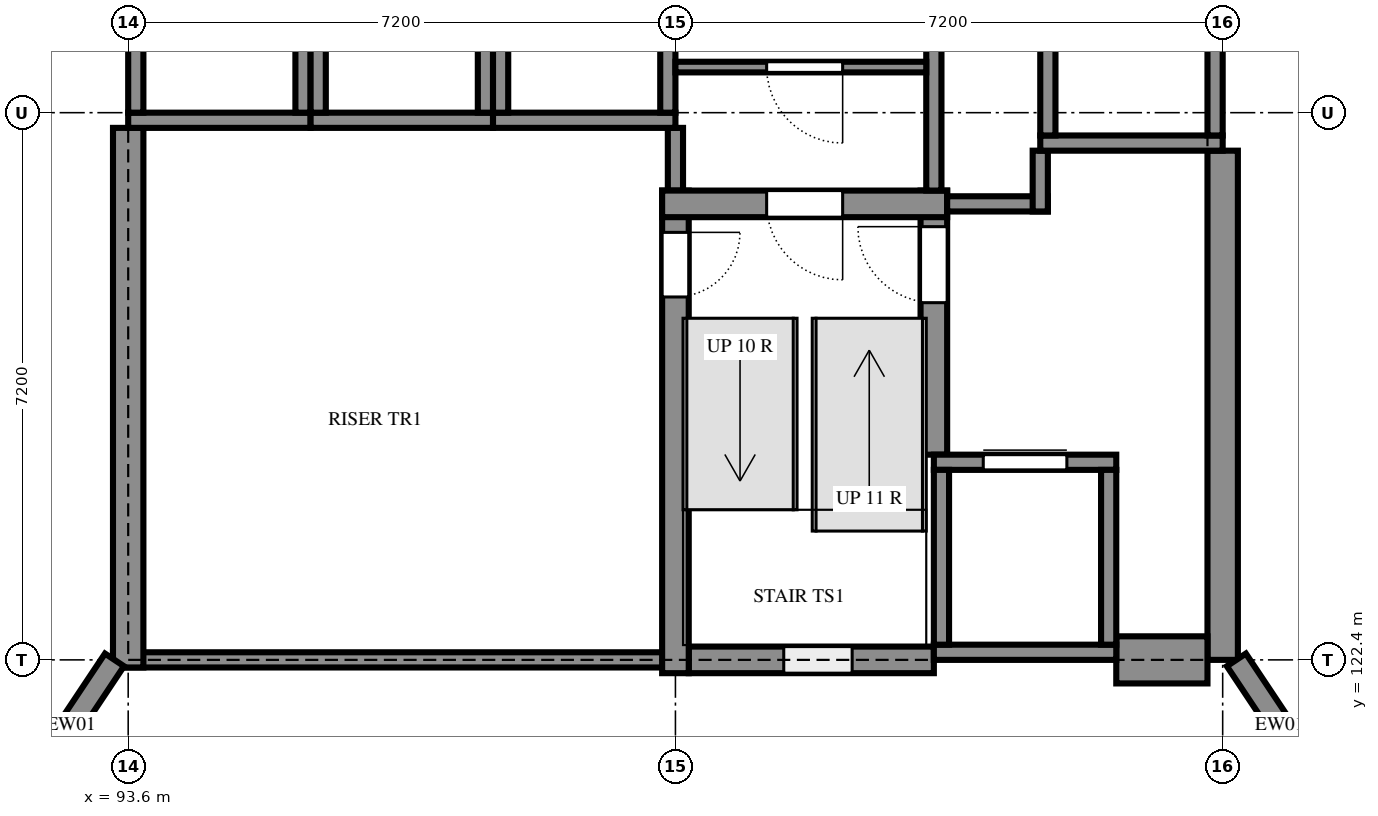
"""IFC4 building model, lengths in metres.
Left out: names, types, materials, properties, quantities, classifications, styles, units other than length and angle.
Written with IfcOpenShell. Run it as: python <this file> out.ifc"""

import sys

from ifc_helpers import new_model, si_unit, direction, frame, frame_2d, origin, place, context, subcontext, project, spatial, rectangle, extrude, element, fill, save


model = new_model("IFC4")
c1 = context("Model", 3, precision=1e-05, world=origin(), true_north=direction((0.0, 1.0)))
c2 = subcontext(c1, "Body", "Model", "MODEL_VIEW")
j1 = project(units=[si_unit("LENGTHUNIT", "METRE"), si_unit("PLANEANGLEUNIT", "RADIAN")], contexts=[c1])
p1 = place(None, origin())
s1 = spatial("IfcSite", under=j1, at=p1, CompositionType="ELEMENT")
p2 = place(p1, origin())
s2 = spatial("IfcBuilding", under=s1, at=p2, CompositionType="ELEMENT")
p3 = place(p2, frame((0.0, 0.0, 21.6)))
s3 = spatial("IfcBuildingStorey", under=s2, at=p3, CompositionType="ELEMENT", Elevation=21.6)
p4 = place(p3, frame((93.4, 122.4, 0.0), z_axis=(0.0, 0.0, 1.0), x_axis=(1.0, 0.0, 0.0)))
e1 = element("IfcWall", 1, at=p4, inside=s3, PredefinedType="SHEAR", context=c2, shape_type="SweptSolid", body=[
    extrude(rectangle(XDim=7.575, YDim=0.2, at=frame_2d((3.788, 0.0))), origin(), (0.0, 0.0, 1.0), 3.6),
])
p5 = place(p3, frame((100.975, 122.4, 0.0), z_axis=(0.0, 0.0, 1.0), x_axis=(1.0, 0.0, 0.0)))
e2 = element("IfcWall", 2, at=p5, inside=s3, PredefinedType="SHEAR", context=c2, shape_type="SweptSolid", body=[
    extrude(rectangle(XDim=3.225, YDim=0.35, at=frame_2d((1.612, 0.0))), origin(), (0.0, 0.0, 1.0), 3.6),
])
p6 = place(p5, frame((1.25, 0.0, 0.6)))
e3 = element("IfcOpeningElement", 3, at=p6, cuts=e2, PredefinedType="OPENING", context=c2, shape_type="SweptSolid", body=[
    extrude(rectangle(XDim=0.9, YDim=2.1, at=frame_2d((0.45, 1.05))), frame((0.0, 0.185, 0.0), z_axis=(0.0, -1.0, 0.0), x_axis=(1.0, 0.0, 0.0)), (0.0, 0.0, 1.0), 0.37),
])
p7 = place(p3, frame((108.0, 122.4, 0.0), z_axis=(0.0, 0.0, 1.0), x_axis=(0.0, 1.0, 0.0)))
e4 = element("IfcWall", 4, at=p7, inside=s3, PredefinedType="SHEAR", context=c2, shape_type="SweptSolid", body=[
    extrude(rectangle(XDim=6.7, YDim=0.4, at=frame_2d((3.35, 0.0))), origin(), (0.0, 0.0, 1.0), 3.6),
])
p8 = place(p3, frame((104.2, 125.1, 0.0), z_axis=(0.0, 0.0, 1.0), x_axis=(0.0, 1.0, 0.0)))
e5 = element("IfcWall", 5, at=p8, inside=s3, PredefinedType="SHEAR", context=c2, shape_type="SweptSolid", body=[
    extrude(rectangle(XDim=3.475, YDim=0.35, at=frame_2d((1.737, 0.0))), origin(), (0.0, 0.0, 1.0), 3.6),
])
p9 = place(p8, frame((2.0, 0.0, 0.0)))
e6 = element("IfcOpeningElement", 6, at=p9, cuts=e5, PredefinedType="OPENING", context=c2, shape_type="SweptSolid", body=[
    extrude(rectangle(XDim=1.0, YDim=2.1, at=frame_2d((0.5, 1.05))), frame((0.0, 0.185, 0.0), z_axis=(0.0, -1.0, 0.0), x_axis=(1.0, 0.0, 0.0)), (0.0, 0.0, 1.0), 0.37),
])
p10 = place(p3, frame((100.8, 128.575, 0.0), z_axis=(0.0, 0.0, 1.0), x_axis=(0.0, -1.0, 0.0)))
e7 = element("IfcWall", 7, at=p10, inside=s3, PredefinedType="SHEAR", context=c2, shape_type="SweptSolid", body=[
    extrude(rectangle(XDim=6.35, YDim=0.35, at=frame_2d((3.175, 0.0))), origin(), (0.0, 0.0, 1.0), 3.6),
])
p11 = place(p10, frame((0.55, 0.0, 0.0)))
e8 = element("IfcOpeningElement", 8, at=p11, cuts=e7, PredefinedType="OPENING", context=c2, shape_type="SweptSolid", body=[
    extrude(rectangle(XDim=0.85, YDim=2.1, at=frame_2d((0.425, 1.05))), frame((0.0, 0.185, 0.0), z_axis=(0.0, -1.0, 0.0), x_axis=(1.0, 0.0, 0.0)), (0.0, 0.0, 1.0), 0.37),
])
p12 = place(p3, frame((100.8, 128.575, 0.0), z_axis=(0.0, 0.0, 1.0), x_axis=(0.0, 1.0, 0.0)))
e9 = element("IfcWall", 9, at=p12, inside=s3, PredefinedType="SHEAR", context=c2, shape_type="SweptSolid", body=[
    extrude(rectangle(XDim=0.825, YDim=0.2, at=frame_2d((0.413, 0.0))), origin(), (0.0, 0.0, 1.0), 3.6),
])
p13 = place(p3, frame((104.375, 128.4, 0.0), z_axis=(0.0, 0.0, 1.0), x_axis=(-1.0, 0.0, 0.0)))
e10 = element("IfcWall", 10, at=p13, inside=s3, PredefinedType="SHEAR", context=c2, shape_type="SweptSolid", body=[
    extrude(rectangle(XDim=3.75, YDim=0.35, at=frame_2d((1.875, 0.0))), origin(), (0.0, 0.0, 1.0), 3.6),
])
p14 = place(p13, frame((1.375, 0.0, 0.0)))
e11 = element("IfcOpeningElement", 11, at=p14, cuts=e10, PredefinedType="OPENING", context=c2, shape_type="SweptSolid", body=[
    extrude(rectangle(XDim=1.0, YDim=2.1, at=frame_2d((0.5, 1.05))), frame((0.0, 0.185, 0.0), z_axis=(0.0, -1.0, 0.0), x_axis=(1.0, 0.0, 0.0)), (0.0, 0.0, 1.0), 0.37),
])
p15 = place(p3, frame((104.375, 128.4, 0.0), z_axis=(0.0, 0.0, 1.0), x_axis=(1.0, 0.0, 0.0)))
e12 = element("IfcWall", 12, at=p15, inside=s3, PredefinedType="SHEAR", context=c2, shape_type="SweptSolid", body=[
    extrude(rectangle(XDim=1.325, YDim=0.2, at=frame_2d((0.663, 0.0))), origin(), (0.0, 0.0, 1.0), 3.6),
])
p16 = place(p3, frame((105.6, 128.3, 0.0), z_axis=(0.0, 0.0, 1.0), x_axis=(0.0, 1.0, 0.0)))
e13 = element("IfcWall", 13, at=p16, inside=s3, PredefinedType="SHEAR", context=c2, shape_type="SweptSolid", body=[
    extrude(rectangle(XDim=0.8, YDim=0.2, at=frame_2d((0.4, 0.0))), origin(), (0.0, 0.0, 1.0), 3.6),
])
p17 = place(p3, frame((93.6, 129.4, 0.0), z_axis=(0.0, 0.0, 1.0), x_axis=(0.0, -1.0, 0.0)))
e14 = element("IfcWall", 14, at=p17, inside=s3, PredefinedType="SHEAR", context=c2, shape_type="SweptSolid", body=[
    extrude(rectangle(XDim=7.1, YDim=0.4, at=frame_2d((3.55, 0.0))), origin(), (0.0, 0.0, 1.0), 3.6),
])
p18 = place(p3, frame((104.2, 132.1, 0.0), z_axis=(0.0, 0.0, 1.0), x_axis=(0.0, -1.0, 0.0)))
e15 = element("IfcWall", 15, at=p18, inside=s3, PredefinedType="SHEAR", context=c2, shape_type="SweptSolid", body=[
    extrude(rectangle(XDim=3.525, YDim=0.2, at=frame_2d((1.763, 0.0))), origin(), (0.0, 0.0, 1.0), 3.6),
])
p19 = place(p3, frame((106.6, 122.4, 0.0), z_axis=(0.0, 0.0, 1.0), x_axis=(1.0, 0.0, 0.0)))
e16 = element("IfcWall", 16, at=p19, inside=s3, PredefinedType="SOLIDWALL", context=c2, shape_type="SweptSolid", body=[
    extrude(rectangle(XDim=1.2, YDim=0.62, at=frame_2d((0.6, 0.0))), origin(), (0.0, 0.0, 1.0), 3.46),
])
for number, where, z_axis, x_axis in (
    (17, (93.42, 122.4, 0.0), (0.0, 0.0, 1.0), (-0.555, -0.832, 0.0)),
    (18, (108.18, 122.4, 0.0), (0.0, 0.0, 1.0), (0.555, -0.832, 0.0)),
):
    element("IfcWall", number, at=place(p3, frame(where, z_axis=z_axis, x_axis=x_axis)), inside=s3, PredefinedType="SOLIDWALL", context=c2, shape_type="SweptSolid", body=[
        extrude(rectangle(XDim=2.063, YDim=0.3, at=frame_2d((1.032, 0.0))), origin(), (0.0, 0.0, 1.0), 3.22),
    ])
p20 = place(p3, frame((93.6, 129.5, 0.0), z_axis=(0.0, 0.0, 1.0), x_axis=(1.0, 0.0, 0.0)))
e19 = element("IfcWall", 19, at=p20, inside=s3, PredefinedType="SHEAR", context=c2, shape_type="SweptSolid", body=[
    extrude(rectangle(XDim=2.4, YDim=0.2, at=frame_2d((1.2, 0.0))), origin(), (0.0, 0.0, 1.0), 3.6),
])
for number, where, z_axis, x_axis in (
    (20, (93.7, 129.6, 0.0), (0.0, 0.0, 1.0), (0.0, 1.0, 0.0)),
    (21, (95.9, 129.6, 0.0), (0.0, 0.0, 1.0), (0.0, 1.0, 0.0)),
):
    element("IfcWall", number, at=place(p3, frame(where, z_axis=z_axis, x_axis=x_axis)), inside=s3, PredefinedType="SHEAR", context=c2, shape_type="SweptSolid", body=[
        extrude(rectangle(XDim=2.2, YDim=0.2, at=frame_2d((1.1, 0.0))), origin(), (0.0, 0.0, 1.0), 3.6),
    ])
p21 = place(p3, frame((96.0, 129.5, 0.0), z_axis=(0.0, 0.0, 1.0), x_axis=(1.0, 0.0, 0.0)))
e22 = element("IfcWall", 22, at=p21, inside=s3, PredefinedType="SHEAR", context=c2, shape_type="SweptSolid", body=[
    extrude(rectangle(XDim=2.4, YDim=0.2, at=frame_2d((1.2, 0.0))), origin(), (0.0, 0.0, 1.0), 3.6),
])
for number, where, z_axis, x_axis in (
    (23, (96.1, 129.6, 0.0), (0.0, 0.0, 1.0), (0.0, 1.0, 0.0)),
    (24, (98.3, 129.6, 0.0), (0.0, 0.0, 1.0), (0.0, 1.0, 0.0)),
):
    element("IfcWall", number, at=place(p3, frame(where, z_axis=z_axis, x_axis=x_axis)), inside=s3, PredefinedType="SHEAR", context=c2, shape_type="SweptSolid", body=[
        extrude(rectangle(XDim=2.2, YDim=0.2, at=frame_2d((1.1, 0.0))), origin(), (0.0, 0.0, 1.0), 3.6),
    ])
p22 = place(p3, frame((98.4, 129.5, 0.0), z_axis=(0.0, 0.0, 1.0), x_axis=(1.0, 0.0, 0.0)))
e25 = element("IfcWall", 25, at=p22, inside=s3, PredefinedType="SHEAR", context=c2, shape_type="SweptSolid", body=[
    extrude(rectangle(XDim=2.4, YDim=0.2, at=frame_2d((1.2, 0.0))), origin(), (0.0, 0.0, 1.0), 3.6),
])
for number, where, z_axis, x_axis in (
    (26, (98.5, 129.6, 0.0), (0.0, 0.0, 1.0), (0.0, 1.0, 0.0)),
    (27, (100.7, 129.6, 0.0), (0.0, 0.0, 1.0), (0.0, 1.0, 0.0)),
):
    element("IfcWall", number, at=place(p3, frame(where, z_axis=z_axis, x_axis=x_axis)), inside=s3, PredefinedType="SHEAR", context=c2, shape_type="SweptSolid", body=[
        extrude(rectangle(XDim=2.2, YDim=0.2, at=frame_2d((1.1, 0.0))), origin(), (0.0, 0.0, 1.0), 3.6),
    ])
p23 = place(p3, frame((104.2, 122.5, 0.0), z_axis=(0.0, 0.0, 1.0), x_axis=(1.0, 0.0, 0.0)))
e28 = element("IfcWall", 28, at=p23, inside=s3, PredefinedType="SHEAR", context=c2, shape_type="SweptSolid", body=[
    extrude(rectangle(XDim=2.4, YDim=0.2, at=frame_2d((1.2, 0.0))), origin(), (0.0, 0.0, 1.0), 3.6),
])
p24 = place(p3, frame((104.2, 125.0, 0.0), z_axis=(0.0, 0.0, 1.0), x_axis=(1.0, 0.0, 0.0)))
e29 = element("IfcWall", 29, at=p24, inside=s3, PredefinedType="SHEAR", context=c2, shape_type="SweptSolid", body=[
    extrude(rectangle(XDim=2.4, YDim=0.2, at=frame_2d((1.2, 0.0))), origin(), (0.0, 0.0, 1.0), 3.6),
])
p25 = place(p24, frame((0.65, 0.0, 0.0)))
e30 = element("IfcOpeningElement", 30, at=p25, cuts=e29, PredefinedType="OPENING", context=c2, shape_type="SweptSolid", body=[
    extrude(rectangle(XDim=1.1, YDim=2.1, at=frame_2d((0.55, 1.05))), frame((0.0, 0.11, 0.0), z_axis=(0.0, -1.0, 0.0), x_axis=(1.0, 0.0, 0.0)), (0.0, 0.0, 1.0), 0.22),
])
for number, where, z_axis, x_axis in (
    (31, (104.3, 122.6, 0.0), (0.0, 0.0, 1.0), (0.0, 1.0, 0.0)),
    (32, (106.5, 122.6, 0.0), (0.0, 0.0, 1.0), (0.0, 1.0, 0.0)),
):
    element("IfcWall", number, at=place(p3, frame(where, z_axis=z_axis, x_axis=x_axis)), inside=s3, PredefinedType="SHEAR", context=c2, shape_type="SweptSolid", body=[
        extrude(rectangle(XDim=2.3, YDim=0.2, at=frame_2d((1.15, 0.0))), origin(), (0.0, 0.0, 1.0), 3.6),
    ])
p26 = place(p3, frame((105.6, 129.2, 0.0), z_axis=(0.0, 0.0, 1.0), x_axis=(1.0, 0.0, 0.0)))
e33 = element("IfcWall", 33, at=p26, inside=s3, PredefinedType="SHEAR", context=c2, shape_type="SweptSolid", body=[
    extrude(rectangle(XDim=2.4, YDim=0.2, at=frame_2d((1.2, 0.0))), origin(), (0.0, 0.0, 1.0), 3.6),
])
for number, where, z_axis, x_axis in (
    (34, (105.7, 129.3, 0.0), (0.0, 0.0, 1.0), (0.0, 1.0, 0.0)),
    (35, (107.9, 129.3, 0.0), (0.0, 0.0, 1.0), (0.0, 1.0, 0.0)),
):
    element("IfcWall", number, at=place(p3, frame(where, z_axis=z_axis, x_axis=x_axis)), inside=s3, PredefinedType="SHEAR", context=c2, shape_type="SweptSolid", body=[
        extrude(rectangle(XDim=2.5, YDim=0.2, at=frame_2d((1.25, 0.0))), origin(), (0.0, 0.0, 1.0), 3.6),
    ])
p27 = place(p3, frame((100.8, 130.2, 0.0), z_axis=(0.0, 0.0, 1.0), x_axis=(1.0, 0.0, 0.0)))
e36 = element("IfcWall", 36, at=p27, inside=s3, PredefinedType="PARTITIONING", context=c2, shape_type="SweptSolid", body=[
    extrude(rectangle(XDim=3.3, YDim=0.14, at=frame_2d((1.65, 0.0))), origin(), (0.0, 0.0, 1.0), 3.46),
])
p28 = place(p27, frame((1.2, 0.0, 0.0)))
e37 = element("IfcOpeningElement", 37, at=p28, cuts=e36, PredefinedType="OPENING", context=c2, shape_type="SweptSolid", body=[
    extrude(rectangle(XDim=1.0, YDim=2.1, at=frame_2d((0.5, 1.05))), frame((0.0, 0.08, 0.0), z_axis=(0.0, -1.0, 0.0), x_axis=(1.0, 0.0, 0.0)), (0.0, 0.0, 1.0), 0.16),
])
p29 = place(p6, origin())
e38 = element("IfcWindow", 38, at=p29, inside=s3, PartitioningType="SINGLE_PANEL", PredefinedType="WINDOW", context=c2, shape_type="SweptSolid", body=[
    extrude(rectangle(XDim=0.9, YDim=2.1, at=frame_2d((0.45, 1.05))), frame((0.0, 0.03, 0.0), z_axis=(0.0, -1.0, 0.0), x_axis=(1.0, 0.0, 0.0)), (0.0, 0.0, 1.0), 0.06),
])
fill(e3, e38)
p30 = place(p25, origin())
e39 = element("IfcDoor", 39, at=p30, inside=s3, OperationType="SLIDING_TO_LEFT", PredefinedType="DOOR", context=c2, shape_type="SweptSolid", body=[
    extrude(rectangle(XDim=1.1, YDim=2.1, at=frame_2d((0.55, 1.05))), frame((0.0, 0.025, 0.0), z_axis=(0.0, -1.0, 0.0), x_axis=(1.0, 0.0, 0.0)), (0.0, 0.0, 1.0), 0.05),
])
fill(e30, e39)
p31 = place(p28, frame((1.0, 0.0, 0.0), z_axis=(0.0, 0.0, 1.0), x_axis=(-1.0, 0.0, 0.0)))
e40 = element("IfcDoor", 40, at=p31, inside=s3, OperationType="SINGLE_SWING_RIGHT", PredefinedType="DOOR", context=c2, shape_type="SweptSolid", body=[
    extrude(rectangle(XDim=1.0, YDim=2.1, at=frame_2d((0.5, 1.05))), frame((0.0, 0.025, 0.0), z_axis=(0.0, -1.0, 0.0), x_axis=(1.0, 0.0, 0.0)), (0.0, 0.0, 1.0), 0.05),
])
fill(e37, e40)
p32 = place(p14, origin())
e41 = element("IfcDoor", 41, at=p32, inside=s3, OperationType="SINGLE_SWING_RIGHT", PredefinedType="DOOR", context=c2, shape_type="SweptSolid", body=[
    extrude(rectangle(XDim=1.0, YDim=2.1, at=frame_2d((0.5, 1.05))), frame((0.0, 0.025, 0.0), z_axis=(0.0, -1.0, 0.0), x_axis=(1.0, 0.0, 0.0)), (0.0, 0.0, 1.0), 0.05),
])
fill(e11, e41)
p33 = place(p11, origin())
e42 = element("IfcDoor", 42, at=p33, inside=s3, OperationType="SINGLE_SWING_RIGHT", PredefinedType="DOOR", context=c2, shape_type="SweptSolid", body=[
    extrude(rectangle(XDim=0.85, YDim=2.1, at=frame_2d((0.425, 1.05))), frame((0.0, 0.025, 0.0), z_axis=(0.0, -1.0, 0.0), x_axis=(1.0, 0.0, 0.0)), (0.0, 0.0, 1.0), 0.05),
])
fill(e8, e42)
p34 = place(p9, origin())
e43 = element("IfcDoor", 43, at=p34, inside=s3, OperationType="SINGLE_SWING_LEFT", PredefinedType="DOOR", context=c2, shape_type="SweptSolid", body=[
    extrude(rectangle(XDim=1.0, YDim=2.1, at=frame_2d((0.5, 1.05))), frame((0.0, 0.025, 0.0), z_axis=(0.0, -1.0, 0.0), x_axis=(1.0, 0.0, 0.0)), (0.0, 0.0, 1.0), 0.05),
])
fill(e6, e43)
save(model, sys.argv[1])
